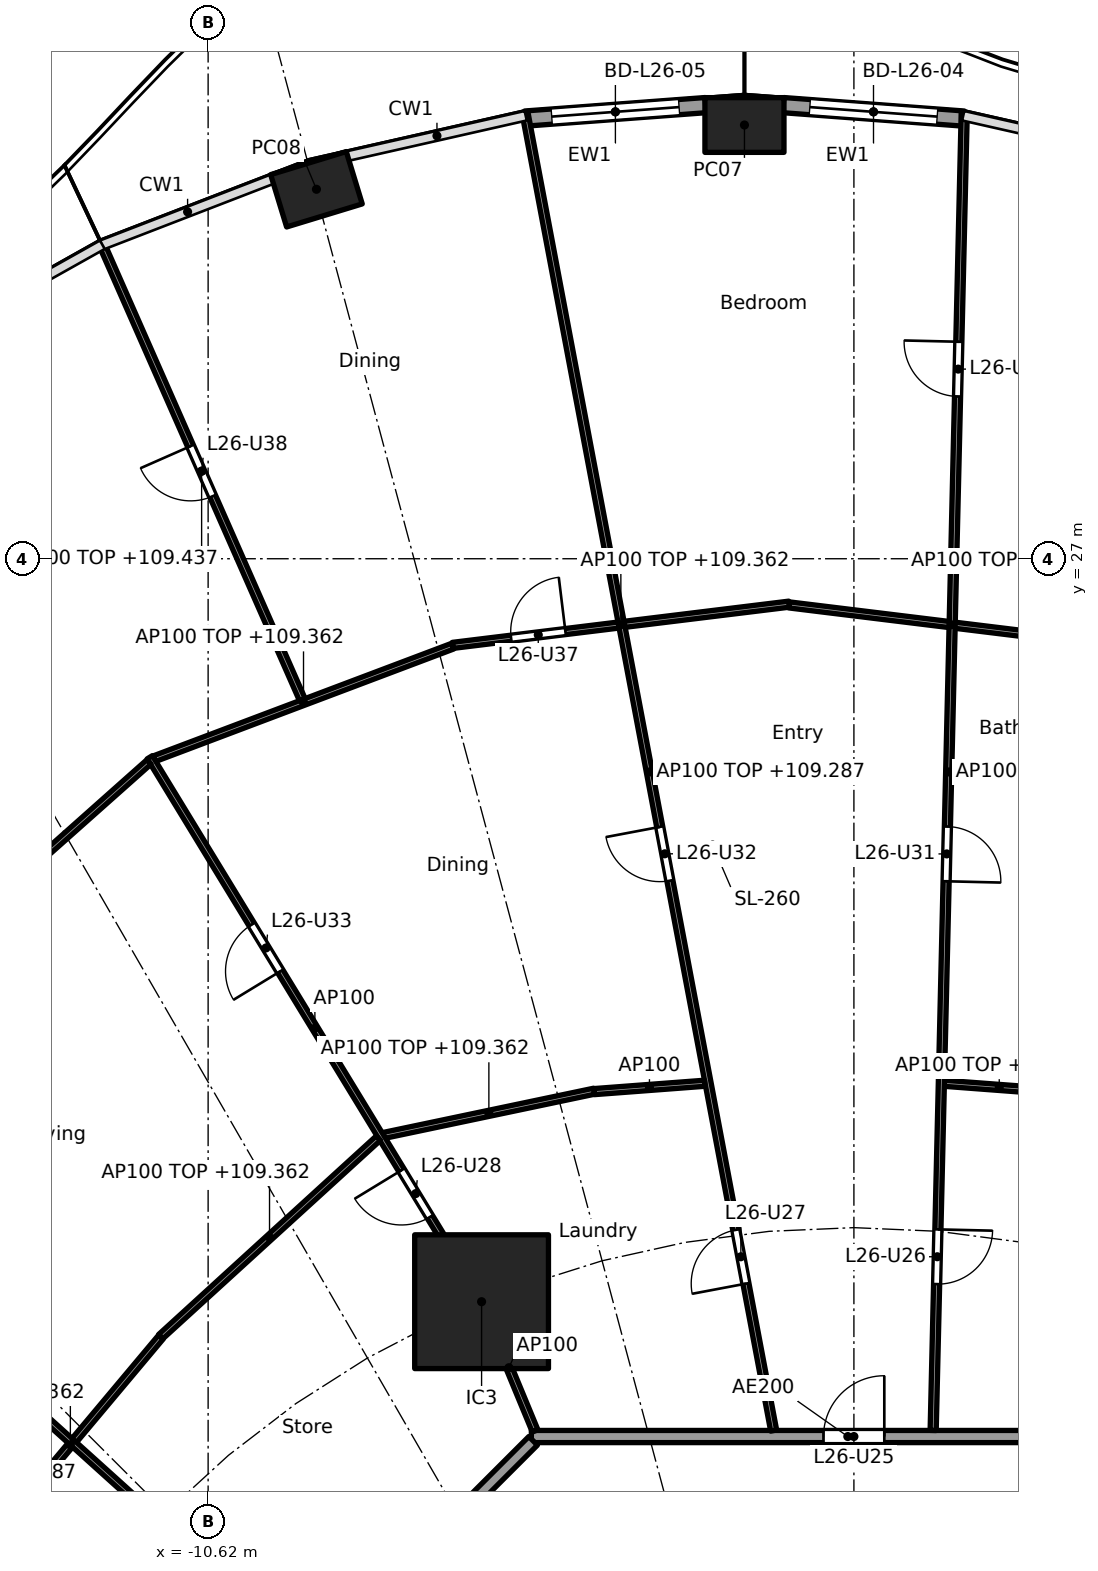
"""IFC4 building model, lengths in metres.
Left out: names, types, materials, properties, quantities, classifications, styles, units other than length and angle.
Written with IfcOpenShell. Run it as: python <this file> out.ifc"""

import sys

from ifc_helpers import new_model, si_unit, direction, frame, frame_2d, origin, origin_2d, place, context, subcontext, project, spatial, rectangle, hollow_rectangle, extrude, element, fill, save


model = new_model("IFC4")
c1 = context("Model", 3, precision=1e-05, world=origin(), true_north=direction((0.0, 1.0)))
c2 = subcontext(c1, "Body", "Model", "MODEL_VIEW")
j1 = project(units=[si_unit("LENGTHUNIT", "METRE"), si_unit("PLANEANGLEUNIT", "RADIAN")], contexts=[c1])
p1 = place(None, origin())
s1 = spatial("IfcSite", under=j1, at=p1, CompositionType="ELEMENT")
p2 = place(p1, origin())
s2 = spatial("IfcBuilding", under=s1, at=p2, CompositionType="ELEMENT")
p3 = place(p2, frame((0.0, 0.0, 106.6)))
s3 = spatial("IfcBuildingStorey", under=s2, at=p3, CompositionType="ELEMENT", Elevation=106.6)
for number, where, z_axis, x_axis in (
    (1, (-1.8, 34.133, 0.0), (0.0, 0.0, 1.0), (-1.0, 0.0, 0.0)),
    (2, (-8.839, 33.076, 0.0), (0.0, 0.0, 1.0), (-0.957, -0.292, 0.0)),
):
    element("IfcColumn", number, at=place(p3, frame(where, z_axis=z_axis, x_axis=x_axis)), inside=s3, PredefinedType="COLUMN", context=c2, shape_type="SweptSolid", body=[
        extrude(hollow_rectangle(XDim=1.3, YDim=0.9, WallThickness=0.045, at=origin_2d()), origin(), (0.0, 0.0, 1.0), 3.7),
    ])
p4 = place(p3, frame((-6.123, 14.782, 0.0), z_axis=(0.0, 0.0, 1.0), x_axis=(1.0, 0.0, 0.0)))
e3 = element("IfcColumn", 3, at=p4, inside=s3, PredefinedType="COLUMN", context=c2, shape_type="SweptSolid", body=[
    extrude(rectangle(XDim=2.2, YDim=2.2, at=origin_2d()), origin(), (0.0, 0.0, 1.0), 3.7),
])
p5 = place(p3, frame((-1.161, 34.46, 0.0), z_axis=(0.0, 0.0, 1.0), x_axis=(0.997232262224, -0.074349278273, 0.0)))
e4 = element("IfcWall", 4, at=p5, inside=s3, PredefinedType="SOLIDWALL", context=c2, shape_type="SweptSolid", body=[
    extrude(rectangle(XDim=2.975, YDim=0.25, at=frame_2d((1.488, 0.0))), origin(), (0.0, 0.0, 1.0), 3.44),
])
p6 = place(p5, frame((0.438, 0.0, 0.0)))
e5 = element("IfcOpeningElement", 5, at=p6, cuts=e4, PredefinedType="OPENING", context=c2, shape_type="SweptSolid", body=[
    extrude(rectangle(XDim=2.1, YDim=2.4, at=frame_2d((1.05, 1.2))), frame((0.0, 0.135, 0.0), z_axis=(0.0, -1.0, 0.0), x_axis=(1.0, 0.0, 0.0)), (0.0, 0.0, 1.0), 0.27),
])
p7 = place(p3, frame((-5.406, 34.239, 0.0), z_axis=(0.0, 0.0, 1.0), x_axis=(0.997231808538, 0.074355363224, 0.0)))
e6 = element("IfcWall", 6, at=p7, inside=s3, PredefinedType="SOLIDWALL", context=c2, shape_type="SweptSolid", body=[
    extrude(rectangle(XDim=2.975, YDim=0.25, at=frame_2d((1.487, 0.0))), origin(), (0.0, 0.0, 1.0), 3.44),
])
p8 = place(p7, frame((0.438, 0.0, 0.0)))
e7 = element("IfcOpeningElement", 7, at=p8, cuts=e6, PredefinedType="OPENING", context=c2, shape_type="SweptSolid", body=[
    extrude(rectangle(XDim=2.1, YDim=2.4, at=frame_2d((1.05, 1.2))), frame((0.0, 0.135, 0.0), z_axis=(0.0, -1.0, 0.0), x_axis=(1.0, 0.0, 0.0)), (0.0, 0.0, 1.0), 0.27),
])
p9 = place(p3, frame((5.104, 12.565, 0.0), z_axis=(0.0, 0.0, 1.0), x_axis=(-1.0, 0.0, 0.0)))
e8 = element("IfcWall", 8, at=p9, inside=s3, PredefinedType="PARTITIONING", context=c2, shape_type="SweptSolid", body=[
    extrude(rectangle(XDim=10.409, YDim=0.2, at=frame_2d((5.205, 0.0))), origin(), (0.0, 0.0, 1.0), 3.44),
])
p10 = place(p9, frame((4.604, 0.0, 0.0)))
e9 = element("IfcOpeningElement", 9, at=p10, cuts=e8, PredefinedType="OPENING", context=c2, shape_type="SweptSolid", body=[
    extrude(rectangle(XDim=1.0, YDim=2.1, at=frame_2d((0.5, 1.05))), frame((0.0, 0.11, 0.0), z_axis=(0.0, -1.0, 0.0), x_axis=(1.0, 0.0, 0.0)), (0.0, 0.0, 1.0), 0.22),
])
p11 = place(p3, frame((-5.275, 12.494, 0.0), z_axis=(0.0, 0.0, 1.0), x_axis=(-0.707106781187, -0.707106781187, 0.0)))
e10 = element("IfcWall", 10, at=p11, inside=s3, PredefinedType="PARTITIONING", context=c2, shape_type="SweptSolid", body=[
    extrude(rectangle(XDim=10.209, YDim=0.2, at=frame_2d((5.104, 0.0))), origin(), (0.0, 0.0, 1.0), 3.44),
])
p12 = place(p3, frame((3.299, 18.237, 0.0), z_axis=(0.0, 0.0, 1.0), x_axis=(-0.997152920483, 0.075405922664, 0.0)))
e11 = element("IfcWall", 11, at=p12, inside=s3, PredefinedType="PARTITIONING", context=c2, shape_type="SweptSolid", body=[
    extrude(rectangle(XDim=1.823, YDim=0.1, at=frame_2d((0.911, 0.0))), origin(), (0.0, 0.0, 1.0), 2.762),
])
p13 = place(p3, frame((4.267, 25.587, 0.0), z_axis=(0.0, 0.0, 1.0), x_axis=(-0.992576206119, 0.121624319302, 0.0)))
e12 = element("IfcWall", 12, at=p13, inside=s3, PredefinedType="PARTITIONING", context=c2, shape_type="SweptSolid", body=[
    extrude(rectangle(XDim=5.374, YDim=0.1, at=frame_2d((2.687, 0.0))), origin(), (0.0, 0.0, 1.0), 2.762),
])
p14 = place(p3, frame((1.303, 12.665, 0.0), z_axis=(0.0, 0.0, 1.0), x_axis=(0.023564110689, 0.999722327793, 0.0)))
e13 = element("IfcWall", 13, at=p14, inside=s3, PredefinedType="PARTITIONING", context=c2, shape_type="SweptSolid", body=[
    extrude(rectangle(XDim=21.664, YDim=0.1, at=frame_2d((10.832, 0.0))), origin(), (0.0, 0.0, 1.0), 2.687),
])
p15 = place(p14, frame((2.407, 0.0, 0.0)))
e14 = element("IfcOpeningElement", 14, at=p15, cuts=e13, PredefinedType="OPENING", context=c2, shape_type="SweptSolid", body=[
    extrude(rectangle(XDim=0.9, YDim=2.1, at=frame_2d((0.45, 1.05))), frame((0.0, 0.06, 0.0), z_axis=(0.0, -1.0, 0.0), x_axis=(1.0, 0.0, 0.0)), (0.0, 0.0, 1.0), 0.12),
])
p16 = place(p14, frame((9.034, 0.0, 0.0)))
e15 = element("IfcOpeningElement", 15, at=p16, cuts=e13, PredefinedType="OPENING", context=c2, shape_type="SweptSolid", body=[
    extrude(rectangle(XDim=0.9, YDim=2.1, at=frame_2d((0.45, 1.05))), frame((0.0, 0.06, 0.0), z_axis=(0.0, -1.0, 0.0), x_axis=(1.0, 0.0, 0.0)), (0.0, 0.0, 1.0), 0.12),
])
p17 = place(p14, frame((17.009, 0.0, 0.0)))
e16 = element("IfcOpeningElement", 16, at=p17, cuts=e13, PredefinedType="OPENING", context=c2, shape_type="SweptSolid", body=[
    extrude(rectangle(XDim=0.9, YDim=2.1, at=frame_2d((0.45, 1.05))), frame((0.0, 0.06, 0.0), z_axis=(0.0, -1.0, 0.0), x_axis=(1.0, 0.0, 0.0)), (0.0, 0.0, 1.0), 0.12),
])
p18 = place(p3, frame((-1.066, 26.253, 0.0), z_axis=(0.0, 0.0, 1.0), x_axis=(-0.992574197255, -0.121640712523, 0.0)))
e17 = element("IfcWall", 17, at=p18, inside=s3, PredefinedType="PARTITIONING", context=c2, shape_type="SweptSolid", body=[
    extrude(rectangle(XDim=5.574, YDim=0.1, at=frame_2d((2.787, 0.0))), origin(), (0.0, 0.0, 1.0), 2.762),
])
p19 = place(p18, frame((3.705, 0.0, 0.0)))
e18 = element("IfcOpeningElement", 18, at=p19, cuts=e17, PredefinedType="OPENING", context=c2, shape_type="SweptSolid", body=[
    extrude(rectangle(XDim=0.9, YDim=2.1, at=frame_2d((0.45, 1.05))), frame((0.0, 0.06, 0.0), z_axis=(0.0, -1.0, 0.0), x_axis=(1.0, 0.0, 0.0)), (0.0, 0.0, 1.0), 0.12),
])
p20 = place(p3, frame((-1.32, 12.663, 0.0), z_axis=(0.0, 0.0, 1.0), x_axis=(-0.185450638662, 0.982653581187, 0.0)))
e19 = element("IfcWall", 19, at=p20, inside=s3, PredefinedType="PARTITIONING", context=c2, shape_type="SweptSolid", body=[
    extrude(rectangle(XDim=22.043, YDim=0.1, at=frame_2d((11.021, 0.0))), origin(), (0.0, 0.0, 1.0), 2.687),
])
p21 = place(p20, frame((2.458, 0.0, 0.0)))
e20 = element("IfcOpeningElement", 20, at=p21, cuts=e19, PredefinedType="OPENING", context=c2, shape_type="SweptSolid", body=[
    extrude(rectangle(XDim=0.9, YDim=2.1, at=frame_2d((0.45, 1.05))), frame((0.0, 0.06, 0.0), z_axis=(0.0, -1.0, 0.0), x_axis=(1.0, 0.0, 0.0)), (0.0, 0.0, 1.0), 0.12),
])
p22 = place(p20, frame((9.202, 0.0, 0.0)))
e21 = element("IfcOpeningElement", 21, at=p22, cuts=e19, PredefinedType="OPENING", context=c2, shape_type="SweptSolid", body=[
    extrude(rectangle(XDim=0.9, YDim=2.1, at=frame_2d((0.45, 1.05))), frame((0.0, 0.06, 0.0), z_axis=(0.0, -1.0, 0.0), x_axis=(1.0, 0.0, 0.0)), (0.0, 0.0, 1.0), 0.12),
])
p23 = place(p3, frame((-2.453, 18.374, 0.0), z_axis=(0.0, 0.0, 1.0), x_axis=(-0.997153681897, -0.075395853197, 0.0)))
e22 = element("IfcWall", 22, at=p23, inside=s3, PredefinedType="PARTITIONING", context=c2, shape_type="SweptSolid", body=[
    extrude(rectangle(XDim=1.823, YDim=0.1, at=frame_2d((0.912, 0.0))), origin(), (0.0, 0.0, 1.0), 3.44),
])
p24 = place(p3, frame((-4.272, 18.243, 0.0), z_axis=(0.0, 0.0, 1.0), x_axis=(-0.978622947907, -0.205662650547, 0.0)))
e23 = element("IfcWall", 23, at=p24, inside=s3, PredefinedType="PARTITIONING", context=c2, shape_type="SweptSolid", body=[
    extrude(rectangle(XDim=3.538, YDim=0.1, at=frame_2d((1.769, 0.0))), origin(), (0.0, 0.0, 1.0), 2.762),
])
p25 = place(p3, frame((-6.596, 25.563, 0.0), z_axis=(0.0, 0.0, 1.0), x_axis=(-0.9356162121, -0.353018843201, 0.0)))
e24 = element("IfcWall", 24, at=p25, inside=s3, PredefinedType="PARTITIONING", context=c2, shape_type="SweptSolid", body=[
    extrude(rectangle(XDim=5.249, YDim=0.1, at=frame_2d((2.625, 0.0))), origin(), (0.0, 0.0, 1.0), 2.762),
])
p26 = place(p3, frame((-9.072, 24.683, 0.0), z_axis=(0.0, 0.0, 1.0), x_axis=(-0.403192911159, 0.915115007194, 0.0)))
e25 = element("IfcWall", 25, at=p26, inside=s3, PredefinedType="PARTITIONING", context=c2, shape_type="SweptSolid", body=[
    extrude(rectangle(XDim=8.211, YDim=0.1, at=frame_2d((4.106, 0.0))), origin(), (0.0, 0.0, 1.0), 2.837),
])
p27 = place(p26, frame((3.656, 0.0, 0.0)))
e26 = element("IfcOpeningElement", 26, at=p27, cuts=e25, PredefinedType="OPENING", context=c2, shape_type="SweptSolid", body=[
    extrude(rectangle(XDim=0.9, YDim=2.1, at=frame_2d((0.45, 1.05))), frame((0.0, 0.06, 0.0), z_axis=(0.0, -1.0, 0.0), x_axis=(1.0, 0.0, 0.0)), (0.0, 0.0, 1.0), 0.12),
])
p28 = place(p3, frame((-5.243, 12.657, 0.0), z_axis=(0.0, 0.0, 1.0), x_axis=(-0.382703272338, 0.923871314276, 0.0)))
e27 = element("IfcWall", 27, at=p28, inside=s3, PredefinedType="PARTITIONING", context=c2, shape_type="SweptSolid", body=[
    extrude(rectangle(XDim=2.249, YDim=0.1, at=frame_2d((1.125, 0.0))), origin(), (0.0, 0.0, 1.0), 3.44),
])
p29 = place(p3, frame((-6.149, 14.825, 0.0), z_axis=(0.0, 0.0, 1.0), x_axis=(-0.520411490252, 0.853915616917, 0.0)))
e28 = element("IfcWall", 28, at=p29, inside=s3, PredefinedType="PARTITIONING", context=c2, shape_type="SweptSolid", body=[
    extrude(rectangle(XDim=10.435, YDim=0.1, at=frame_2d((5.218, 0.0))), origin(), (0.0, 0.0, 1.0), 3.44),
])
p30 = place(p29, frame((1.582, 0.0, 0.0)))
e29 = element("IfcOpeningElement", 29, at=p30, cuts=e28, PredefinedType="OPENING", context=c2, shape_type="SweptSolid", body=[
    extrude(rectangle(XDim=0.9, YDim=2.1, at=frame_2d((0.45, 1.05))), frame((0.0, 0.06, 0.0), z_axis=(0.0, -1.0, 0.0), x_axis=(1.0, 0.0, 0.0)), (0.0, 0.0, 1.0), 0.12),
])
p31 = place(p29, frame((6.312, 0.0, 0.0)))
e30 = element("IfcOpeningElement", 30, at=p31, cuts=e28, PredefinedType="OPENING", context=c2, shape_type="SweptSolid", body=[
    extrude(rectangle(XDim=0.9, YDim=2.1, at=frame_2d((0.45, 1.05))), frame((0.0, 0.06, 0.0), z_axis=(0.0, -1.0, 0.0), x_axis=(1.0, 0.0, 0.0)), (0.0, 0.0, 1.0), 0.12),
])
p32 = place(p3, frame((-7.82, 17.472, 0.0), z_axis=(0.0, 0.0, 1.0), x_axis=(-0.73885182489, -0.67386792538, 0.0)))
e31 = element("IfcWall", 31, at=p32, inside=s3, PredefinedType="PARTITIONING", context=c2, shape_type="SweptSolid", body=[
    extrude(rectangle(XDim=4.846, YDim=0.1, at=frame_2d((2.423, 0.0))), origin(), (0.0, 0.0, 1.0), 2.762),
])
p33 = place(p3, frame((-11.591, 23.66, 0.0), z_axis=(0.0, 0.0, 1.0), x_axis=(-0.747429278403, -0.664341383466, 0.0)))
e32 = element("IfcWall", 32, at=p33, inside=s3, PredefinedType="PARTITIONING", context=c2, shape_type="SweptSolid", body=[
    extrude(rectangle(XDim=6.073, YDim=0.1, at=frame_2d((3.037, 0.0))), origin(), (0.0, 0.0, 1.0), 2.762),
])
p34 = place(p3, frame((-11.396, 14.202, 0.0), z_axis=(0.0, 0.0, 1.0), x_axis=(-0.642475660273, -0.766306091557, 0.0)))
e33 = element("IfcWall", 33, at=p34, inside=s3, PredefinedType="PARTITIONING", context=c2, shape_type="SweptSolid", body=[
    extrude(rectangle(XDim=4.637, YDim=0.1, at=frame_2d((2.319, 0.0))), origin(), (0.0, 0.0, 1.0), 2.762),
])
p35 = place(p3, frame((-8.959, 8.952, 0.0), z_axis=(0.0, 0.0, 1.0), x_axis=(-0.742679904999, 0.669646592398, 0.0)))
e34 = element("IfcWall", 34, at=p35, inside=s3, PredefinedType="PARTITIONING", context=c2, shape_type="SweptSolid", body=[
    extrude(rectangle(XDim=12.121, YDim=0.1, at=frame_2d((6.061, 0.0))), origin(), (0.0, 0.0, 1.0), 2.687),
])
p36 = place(p35, frame((2.172, 0.0, 0.0)))
e35 = element("IfcOpeningElement", 35, at=p36, cuts=e34, PredefinedType="OPENING", context=c2, shape_type="SweptSolid", body=[
    extrude(rectangle(XDim=0.9, YDim=2.1, at=frame_2d((0.45, 1.05))), frame((0.0, 0.06, 0.0), z_axis=(0.0, -1.0, 0.0), x_axis=(1.0, 0.0, 0.0)), (0.0, 0.0, 1.0), 0.12),
])
p37 = place(p35, frame((8.233, 0.0, 0.0)))
e36 = element("IfcOpeningElement", 36, at=p37, cuts=e34, PredefinedType="OPENING", context=c2, shape_type="SweptSolid", body=[
    extrude(rectangle(XDim=0.9, YDim=2.1, at=frame_2d((0.45, 1.05))), frame((0.0, 0.06, 0.0), z_axis=(0.0, -1.0, 0.0), x_axis=(1.0, 0.0, 0.0)), (0.0, 0.0, 1.0), 0.12),
])
p38 = place(p6, origin())
e37 = element("IfcDoor", 37, at=p38, inside=s3, OperationType="SLIDING_TO_LEFT", PredefinedType="DOOR", context=c2, shape_type="SweptSolid", body=[
    extrude(rectangle(XDim=2.1, YDim=2.4, at=frame_2d((1.05, 1.2))), frame((0.0, 0.025, 0.0), z_axis=(0.0, -1.0, 0.0), x_axis=(1.0, 0.0, 0.0)), (0.0, 0.0, 1.0), 0.05),
])
fill(e5, e37)
p39 = place(p8, origin())
e38 = element("IfcDoor", 38, at=p39, inside=s3, OperationType="SLIDING_TO_LEFT", PredefinedType="DOOR", context=c2, shape_type="SweptSolid", body=[
    extrude(rectangle(XDim=2.1, YDim=2.4, at=frame_2d((1.05, 1.2))), frame((0.0, 0.025, 0.0), z_axis=(0.0, -1.0, 0.0), x_axis=(1.0, 0.0, 0.0)), (0.0, 0.0, 1.0), 0.05),
])
fill(e7, e38)
p40 = place(p10, frame((1.0, 0.0, 0.0), x_axis=(-1.0, 0.0, 0.0)))
e39 = element("IfcDoor", 39, at=p40, inside=s3, OperationType="SINGLE_SWING_RIGHT", PredefinedType="DOOR", context=c2, shape_type="SweptSolid", body=[
    extrude(rectangle(XDim=1.0, YDim=2.1, at=frame_2d((0.5, 1.05))), frame((0.0, 0.025, 0.0), z_axis=(0.0, -1.0, 0.0), x_axis=(1.0, 0.0, 0.0)), (0.0, 0.0, 1.0), 0.05),
])
fill(e9, e39)
p41 = place(p15, frame((0.9, 0.0, 0.0), x_axis=(-1.0, 0.0, 0.0)))
e40 = element("IfcDoor", 40, at=p41, inside=s3, OperationType="SINGLE_SWING_LEFT", PredefinedType="DOOR", context=c2, shape_type="SweptSolid", body=[
    extrude(rectangle(XDim=0.9, YDim=2.1, at=frame_2d((0.45, 1.05))), frame((0.0, 0.025, 0.0), z_axis=(0.0, -1.0, 0.0), x_axis=(1.0, 0.0, 0.0)), (0.0, 0.0, 1.0), 0.05),
])
fill(e14, e40)
p42 = place(p21, origin())
e41 = element("IfcDoor", 41, at=p42, inside=s3, OperationType="SINGLE_SWING_LEFT", PredefinedType="DOOR", context=c2, shape_type="SweptSolid", body=[
    extrude(rectangle(XDim=0.9, YDim=2.1, at=frame_2d((0.45, 1.05))), frame((0.0, 0.025, 0.0), z_axis=(0.0, -1.0, 0.0), x_axis=(1.0, 0.0, 0.0)), (0.0, 0.0, 1.0), 0.05),
])
fill(e20, e41)
p43 = place(p30, origin())
e42 = element("IfcDoor", 42, at=p43, inside=s3, OperationType="SINGLE_SWING_RIGHT", PredefinedType="DOOR", context=c2, shape_type="SweptSolid", body=[
    extrude(rectangle(XDim=0.9, YDim=2.1, at=frame_2d((0.45, 1.05))), frame((0.0, 0.025, 0.0), z_axis=(0.0, -1.0, 0.0), x_axis=(1.0, 0.0, 0.0)), (0.0, 0.0, 1.0), 0.05),
])
fill(e29, e42)
p44 = place(p16, frame((0.9, 0.0, 0.0), x_axis=(-1.0, 0.0, 0.0)))
e43 = element("IfcDoor", 43, at=p44, inside=s3, OperationType="SINGLE_SWING_RIGHT", PredefinedType="DOOR", context=c2, shape_type="SweptSolid", body=[
    extrude(rectangle(XDim=0.9, YDim=2.1, at=frame_2d((0.45, 1.05))), frame((0.0, 0.025, 0.0), z_axis=(0.0, -1.0, 0.0), x_axis=(1.0, 0.0, 0.0)), (0.0, 0.0, 1.0), 0.05),
])
fill(e15, e43)
p45 = place(p22, origin())
e44 = element("IfcDoor", 44, at=p45, inside=s3, OperationType="SINGLE_SWING_RIGHT", PredefinedType="DOOR", context=c2, shape_type="SweptSolid", body=[
    extrude(rectangle(XDim=0.9, YDim=2.1, at=frame_2d((0.45, 1.05))), frame((0.0, 0.025, 0.0), z_axis=(0.0, -1.0, 0.0), x_axis=(1.0, 0.0, 0.0)), (0.0, 0.0, 1.0), 0.05),
])
fill(e21, e44)
p46 = place(p31, origin())
e45 = element("IfcDoor", 45, at=p46, inside=s3, OperationType="SINGLE_SWING_LEFT", PredefinedType="DOOR", context=c2, shape_type="SweptSolid", body=[
    extrude(rectangle(XDim=0.9, YDim=2.1, at=frame_2d((0.45, 1.05))), frame((0.0, 0.025, 0.0), z_axis=(0.0, -1.0, 0.0), x_axis=(1.0, 0.0, 0.0)), (0.0, 0.0, 1.0), 0.05),
])
fill(e30, e45)
p47 = place(p17, origin())
e46 = element("IfcDoor", 46, at=p47, inside=s3, OperationType="SINGLE_SWING_RIGHT", PredefinedType="DOOR", context=c2, shape_type="SweptSolid", body=[
    extrude(rectangle(XDim=0.9, YDim=2.1, at=frame_2d((0.45, 1.05))), frame((0.0, 0.025, 0.0), z_axis=(0.0, -1.0, 0.0), x_axis=(1.0, 0.0, 0.0)), (0.0, 0.0, 1.0), 0.05),
])
fill(e16, e46)
p48 = place(p19, frame((0.9, 0.0, 0.0), x_axis=(-1.0, 0.0, 0.0)))
e47 = element("IfcDoor", 47, at=p48, inside=s3, OperationType="SINGLE_SWING_RIGHT", PredefinedType="DOOR", context=c2, shape_type="SweptSolid", body=[
    extrude(rectangle(XDim=0.9, YDim=2.1, at=frame_2d((0.45, 1.05))), frame((0.0, 0.025, 0.0), z_axis=(0.0, -1.0, 0.0), x_axis=(1.0, 0.0, 0.0)), (0.0, 0.0, 1.0), 0.05),
])
fill(e18, e47)
p49 = place(p27, origin())
e48 = element("IfcDoor", 48, at=p49, inside=s3, OperationType="SINGLE_SWING_RIGHT", PredefinedType="DOOR", context=c2, shape_type="SweptSolid", body=[
    extrude(rectangle(XDim=0.9, YDim=2.1, at=frame_2d((0.45, 1.05))), frame((0.0, 0.025, 0.0), z_axis=(0.0, -1.0, 0.0), x_axis=(1.0, 0.0, 0.0)), (0.0, 0.0, 1.0), 0.05),
])
fill(e26, e48)
save(model, sys.argv[1])
